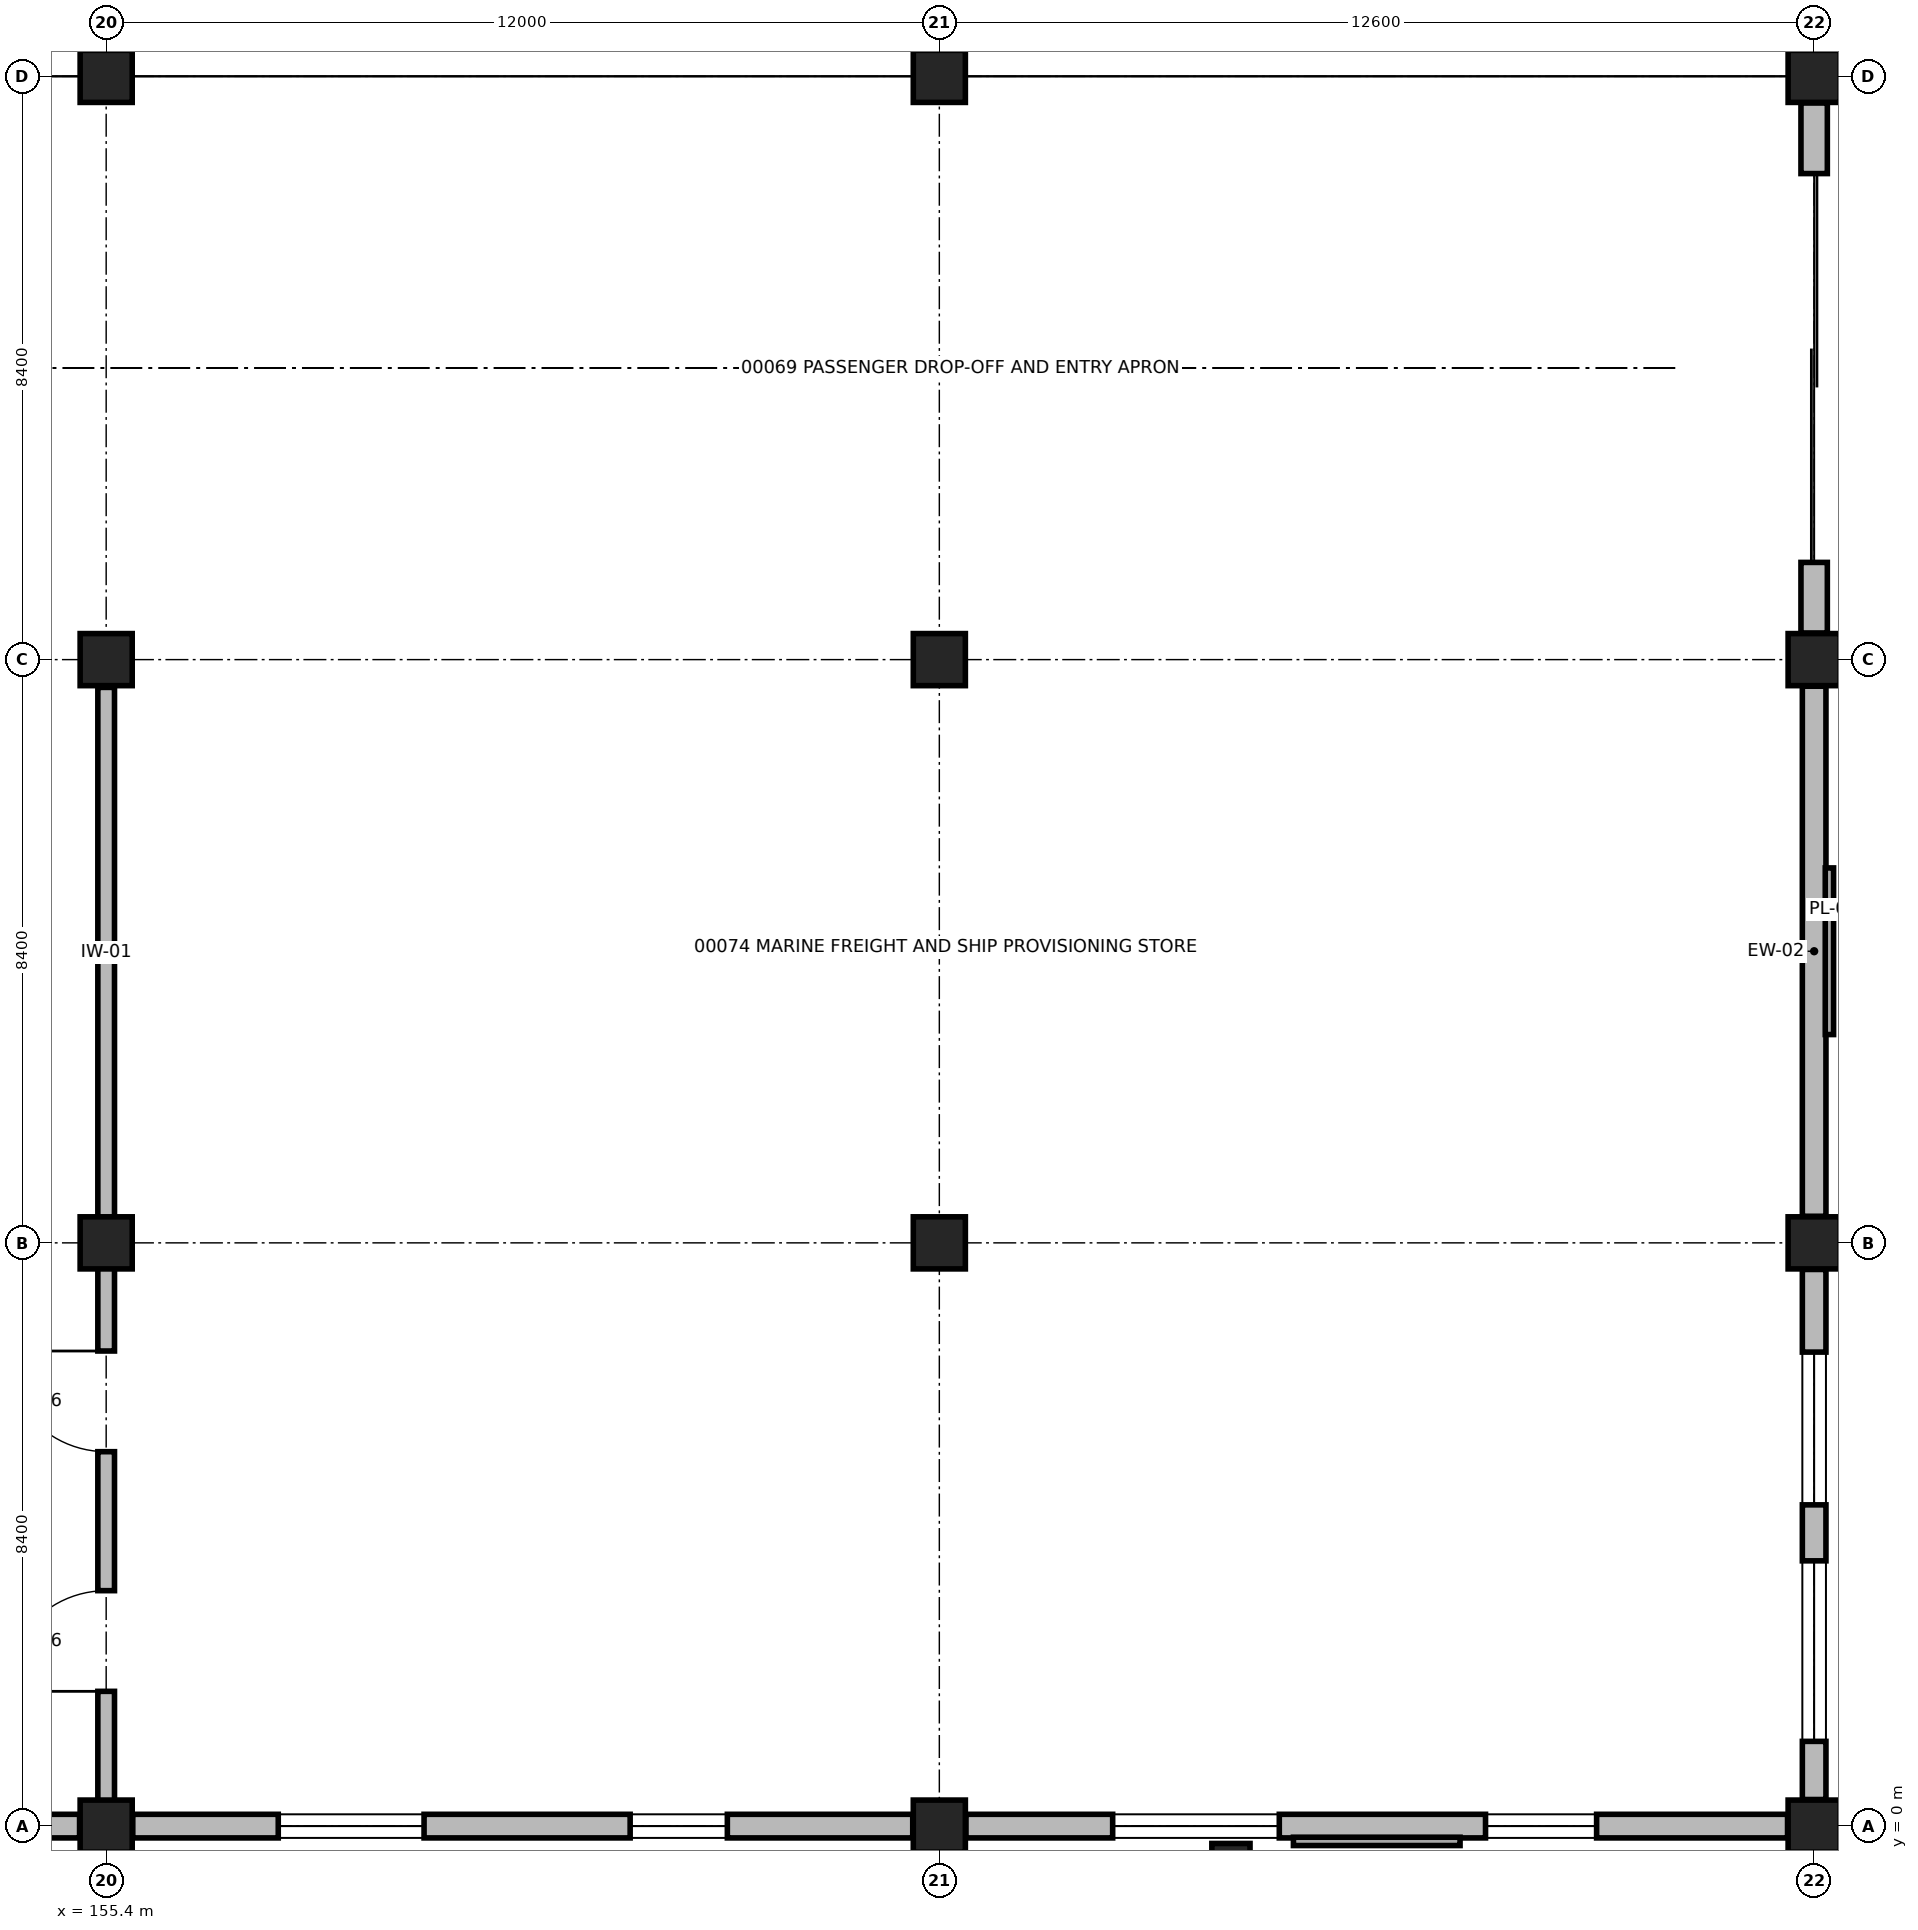
"""IFC4 building model, lengths in metres.
Left out: names, types, materials, properties, quantities, classifications, styles, units other than length and angle.
Written with IfcOpenShell. Run it as: python <this file> out.ifc"""

import sys

from ifc_helpers import new_model, si_unit, direction, frame, frame_2d, origin, origin_2d, place, context, subcontext, project, spatial, rectangle, extrude, element, fill, save


model = new_model("IFC4")
c1 = context("Model", 3, precision=1e-05, world=origin(), true_north=direction((0.0, 1.0)))
c2 = subcontext(c1, "Body", "Model", "MODEL_VIEW")
j1 = project(units=[si_unit("LENGTHUNIT", "METRE"), si_unit("PLANEANGLEUNIT", "RADIAN")], contexts=[c1])
p1 = place(None, origin())
s1 = spatial("IfcSite", under=j1, at=p1, CompositionType="ELEMENT")
p2 = place(p1, origin())
s2 = spatial("IfcBuilding", under=s1, at=p2, CompositionType="ELEMENT")
p3 = place(p2, origin())
s3 = spatial("IfcBuildingStorey", under=s2, at=p3, CompositionType="ELEMENT", Elevation=0.0)
for number, where, z_axis, x_axis in (
    (1, (155.4, 0.0, 0.0), (0.0, 0.0, 1.0), (1.0, 0.0, 0.0)),
    (2, (155.4, 8.4, 0.0), (0.0, 0.0, 1.0), (1.0, 0.0, 0.0)),
    (3, (155.4, 16.8, 0.0), (0.0, 0.0, 1.0), (1.0, 0.0, 0.0)),
    (4, (155.4, 25.2, 0.0), (0.0, 0.0, 1.0), (1.0, 0.0, 0.0)),
    (5, (167.4, 0.0, 0.0), (0.0, 0.0, 1.0), (1.0, 0.0, 0.0)),
    (6, (167.4, 8.4, 0.0), (0.0, 0.0, 1.0), (1.0, 0.0, 0.0)),
    (7, (167.4, 16.8, 0.0), (0.0, 0.0, 1.0), (1.0, 0.0, 0.0)),
    (8, (167.4, 25.2, 0.0), (0.0, 0.0, 1.0), (1.0, 0.0, 0.0)),
    (9, (180.0, 0.0, 0.0), (0.0, 0.0, 1.0), (1.0, 0.0, 0.0)),
    (10, (180.0, 8.4, 0.0), (0.0, 0.0, 1.0), (1.0, 0.0, 0.0)),
    (11, (180.0, 16.8, 0.0), (0.0, 0.0, 1.0), (1.0, 0.0, 0.0)),
    (12, (180.0, 25.2, 0.0), (0.0, 0.0, 1.0), (1.0, 0.0, 0.0)),
):
    element("IfcColumn", number, at=place(p3, frame(where, z_axis=z_axis, x_axis=x_axis)), inside=s3, PredefinedType="COLUMN", context=c2, shape_type="SweptSolid", body=[
        extrude(rectangle(XDim=0.75, YDim=0.75, at=origin_2d()), origin(), (0.0, 0.0, 1.0), 5.1),
    ])
p4 = place(p3, frame((171.6, -0.65, 0.0), z_axis=(0.0, 0.0, 1.0), x_axis=(1.0, 0.0, 0.0)))
e13 = element("IfcColumn", 13, at=p4, inside=s3, PredefinedType="PILASTER", context=c2, shape_type="SweptSolid", body=[
    extrude(rectangle(XDim=0.55, YDim=0.8, at=origin_2d()), origin(), (0.0, 0.0, 1.0), 5.1),
])
p5 = place(p3, frame((155.017, 0.0, 0.0), z_axis=(0.0, 0.0, 1.0), x_axis=(-1.0, 0.0, 0.0)))
e14 = element("IfcWall", 14, at=p5, inside=s3, PredefinedType="SOLIDWALL", context=c2, shape_type="SweptSolid", body=[
    extrude(rectangle(XDim=7.634, YDim=0.34, at=frame_2d((3.817, 0.0))), origin(), (0.0, 0.0, 1.0), 4.346),
])
p6 = place(p5, frame((1.69, 0.0, 1.3)))
e15 = element("IfcOpeningElement", 15, at=p6, cuts=e14, PredefinedType="OPENING", context=c2, shape_type="SweptSolid", body=[
    extrude(rectangle(XDim=1.2, YDim=1.75, at=frame_2d((0.6, 0.875))), frame((0.0, 0.18, 0.0), z_axis=(0.0, -1.0, 0.0), x_axis=(1.0, 0.0, 0.0)), (0.0, 0.0, 1.0), 0.36),
])
p7 = place(p5, frame((4.596, 0.0, 1.3)))
e16 = element("IfcOpeningElement", 16, at=p7, cuts=e14, PredefinedType="OPENING", context=c2, shape_type="SweptSolid", body=[
    extrude(rectangle(XDim=1.8, YDim=2.05, at=frame_2d((0.9, 1.025))), frame((0.0, 0.18, 0.0), z_axis=(0.0, -1.0, 0.0), x_axis=(1.0, 0.0, 0.0)), (0.0, 0.0, 1.0), 0.36),
])
p8 = place(p3, frame((167.017, 0.0, 0.0), z_axis=(0.0, 0.0, 1.0), x_axis=(-1.0, 0.0, 0.0)))
e17 = element("IfcWall", 17, at=p8, inside=s3, PredefinedType="SOLIDWALL", context=c2, shape_type="SweptSolid", body=[
    extrude(rectangle(XDim=11.234, YDim=0.34, at=frame_2d((5.617, 0.0))), origin(), (0.0, 0.0, 1.0), 4.346),
])
p9 = place(p8, frame((2.67, 0.0, 1.3)))
e18 = element("IfcOpeningElement", 18, at=p9, cuts=e17, PredefinedType="OPENING", context=c2, shape_type="SweptSolid", body=[
    extrude(rectangle(XDim=1.4, YDim=1.75, at=frame_2d((0.7, 0.875))), frame((0.0, 0.18, 0.0), z_axis=(0.0, -1.0, 0.0), x_axis=(1.0, 0.0, 0.0)), (0.0, 0.0, 1.0), 0.36),
])
p10 = place(p8, frame((7.039, 0.0, 1.3)))
e19 = element("IfcOpeningElement", 19, at=p10, cuts=e17, PredefinedType="OPENING", context=c2, shape_type="SweptSolid", body=[
    extrude(rectangle(XDim=2.1, YDim=2.05, at=frame_2d((1.05, 1.025))), frame((0.0, 0.18, 0.0), z_axis=(0.0, -1.0, 0.0), x_axis=(1.0, 0.0, 0.0)), (0.0, 0.0, 1.0), 0.36),
])
p11 = place(p3, frame((179.617, 0.0, 0.0), z_axis=(0.0, 0.0, 1.0), x_axis=(-1.0, 0.0, 0.0)))
e20 = element("IfcWall", 20, at=p11, inside=s3, PredefinedType="SOLIDWALL", context=c2, shape_type="SweptSolid", body=[
    extrude(rectangle(XDim=11.834, YDim=0.34, at=frame_2d((5.917, 0.0))), origin(), (0.0, 0.0, 1.0), 4.346),
])
p12 = place(p11, frame((2.75, 0.0, 1.3)))
e21 = element("IfcOpeningElement", 21, at=p12, cuts=e20, PredefinedType="OPENING", context=c2, shape_type="SweptSolid", body=[
    extrude(rectangle(XDim=1.6, YDim=1.75, at=frame_2d((0.8, 0.875))), frame((0.0, 0.18, 0.0), z_axis=(0.0, -1.0, 0.0), x_axis=(1.0, 0.0, 0.0)), (0.0, 0.0, 1.0), 0.36),
])
p13 = place(p11, frame((7.321, 0.0, 1.3)))
e22 = element("IfcOpeningElement", 22, at=p13, cuts=e20, PredefinedType="OPENING", context=c2, shape_type="SweptSolid", body=[
    extrude(rectangle(XDim=2.4, YDim=2.05, at=frame_2d((1.2, 1.025))), frame((0.0, 0.18, 0.0), z_axis=(0.0, -1.0, 0.0), x_axis=(1.0, 0.0, 0.0)), (0.0, 0.0, 1.0), 0.36),
])
p14 = place(p3, frame((180.0, 8.017, 0.0), z_axis=(0.0, 0.0, 1.0), x_axis=(0.0, -1.0, 0.0)))
e23 = element("IfcWall", 23, at=p14, inside=s3, PredefinedType="SOLIDWALL", context=c2, shape_type="SweptSolid", body=[
    extrude(rectangle(XDim=7.634, YDim=0.34, at=frame_2d((3.817, 0.0))), origin(), (0.0, 0.0, 1.0), 4.346),
])
p15 = place(p14, frame((1.19, 0.0, 1.2)))
e24 = element("IfcOpeningElement", 24, at=p15, cuts=e23, PredefinedType="OPENING", context=c2, shape_type="SweptSolid", body=[
    extrude(rectangle(XDim=2.2, YDim=1.45, at=frame_2d((1.1, 0.725))), frame((0.0, 0.18, 0.0), z_axis=(0.0, -1.0, 0.0), x_axis=(1.0, 0.0, 0.0)), (0.0, 0.0, 1.0), 0.36),
])
p16 = place(p14, frame((4.197, 0.0, 1.2)))
e25 = element("IfcOpeningElement", 25, at=p16, cuts=e23, PredefinedType="OPENING", context=c2, shape_type="SweptSolid", body=[
    extrude(rectangle(XDim=2.6, YDim=1.45, at=frame_2d((1.3, 0.725))), frame((0.0, 0.18, 0.0), z_axis=(0.0, -1.0, 0.0), x_axis=(1.0, 0.0, 0.0)), (0.0, 0.0, 1.0), 0.36),
])
p17 = place(p3, frame((180.0, 16.417, 0.0), z_axis=(0.0, 0.0, 1.0), x_axis=(0.0, -1.0, 0.0)))
e26 = element("IfcWall", 26, at=p17, inside=s3, PredefinedType="SOLIDWALL", context=c2, shape_type="SweptSolid", body=[
    extrude(rectangle(XDim=7.634, YDim=0.34, at=frame_2d((3.817, 0.0))), origin(), (0.0, 0.0, 1.0), 4.346),
])
p18 = place(p3, frame((180.0, 24.817, 0.0), z_axis=(0.0, 0.0, 1.0), x_axis=(0.0, -1.0, 0.0)))
e27 = element("IfcWall", 27, at=p18, inside=s3, PredefinedType="SOLIDWALL", context=c2, shape_type="SweptSolid", body=[
    extrude(rectangle(XDim=7.634, YDim=0.38, at=frame_2d((3.817, 0.0))), origin(), (0.0, 0.0, 1.0), 4.346),
])
p19 = place(p18, frame((1.017, 0.0, 0.0)))
e28 = element("IfcOpeningElement", 28, at=p19, cuts=e27, PredefinedType="OPENING", context=c2, shape_type="SweptSolid", body=[
    extrude(rectangle(XDim=5.6, YDim=3.9, at=frame_2d((2.8, 1.95))), frame((0.0, 0.2, 0.0), z_axis=(0.0, -1.0, 0.0), x_axis=(1.0, 0.0, 0.0)), (0.0, 0.0, 1.0), 0.4),
])
p20 = place(p3, frame((155.4, 0.365, 0.0), z_axis=(0.0, 0.0, 1.0), x_axis=(0.0, 1.0, 0.0)))
e29 = element("IfcWall", 29, at=p20, inside=s3, PredefinedType="SOLIDWALL", context=c2, shape_type="SweptSolid", body=[
    extrude(rectangle(XDim=7.67, YDim=0.24, at=frame_2d((3.835, 0.0))), origin(), (0.0, 0.0, 1.0), 4.346),
])
p21 = place(p20, frame((1.576, 0.0, 0.0)))
e30 = element("IfcOpeningElement", 30, at=p21, cuts=e29, PredefinedType="OPENING", context=c2, shape_type="SweptSolid", body=[
    extrude(rectangle(XDim=1.45, YDim=2.25, at=frame_2d((0.725, 1.125))), frame((0.0, 0.13, 0.0), z_axis=(0.0, -1.0, 0.0), x_axis=(1.0, 0.0, 0.0)), (0.0, 0.0, 1.0), 0.26),
])
p22 = place(p20, frame((5.028, 0.0, 0.0)))
e31 = element("IfcOpeningElement", 31, at=p22, cuts=e29, PredefinedType="OPENING", context=c2, shape_type="SweptSolid", body=[
    extrude(rectangle(XDim=1.45, YDim=2.25, at=frame_2d((0.725, 1.125))), frame((0.0, 0.13, 0.0), z_axis=(0.0, -1.0, 0.0), x_axis=(1.0, 0.0, 0.0)), (0.0, 0.0, 1.0), 0.26),
])
p23 = place(p3, frame((155.4, 8.765, 0.0), z_axis=(0.0, 0.0, 1.0), x_axis=(0.0, 1.0, 0.0)))
e32 = element("IfcWall", 32, at=p23, inside=s3, PredefinedType="SOLIDWALL", context=c2, shape_type="SweptSolid", body=[
    extrude(rectangle(XDim=7.635, YDim=0.24, at=frame_2d((3.817, 0.0))), origin(), (0.0, 0.0, 1.0), 4.346),
])
p24 = place(p9, origin())
e33 = element("IfcWindow", 33, at=p24, inside=s3, PartitioningType="SINGLE_PANEL", PredefinedType="WINDOW", context=c2, shape_type="SweptSolid", body=[
    extrude(rectangle(XDim=1.4, YDim=1.75, at=frame_2d((0.7, 0.875))), frame((0.0, 0.03, 0.0), z_axis=(0.0, -1.0, 0.0), x_axis=(1.0, 0.0, 0.0)), (0.0, 0.0, 1.0), 0.06),
])
fill(e18, e33)
p25 = place(p10, origin())
e34 = element("IfcWindow", 34, at=p25, inside=s3, PartitioningType="SINGLE_PANEL", PredefinedType="WINDOW", context=c2, shape_type="SweptSolid", body=[
    extrude(rectangle(XDim=2.1, YDim=2.05, at=frame_2d((1.05, 1.025))), frame((0.0, 0.03, 0.0), z_axis=(0.0, -1.0, 0.0), x_axis=(1.0, 0.0, 0.0)), (0.0, 0.0, 1.0), 0.06),
])
fill(e19, e34)
p26 = place(p12, origin())
e35 = element("IfcWindow", 35, at=p26, inside=s3, PartitioningType="SINGLE_PANEL", PredefinedType="WINDOW", context=c2, shape_type="SweptSolid", body=[
    extrude(rectangle(XDim=1.6, YDim=1.75, at=frame_2d((0.8, 0.875))), frame((0.0, 0.03, 0.0), z_axis=(0.0, -1.0, 0.0), x_axis=(1.0, 0.0, 0.0)), (0.0, 0.0, 1.0), 0.06),
])
fill(e21, e35)
p27 = place(p13, origin())
e36 = element("IfcWindow", 36, at=p27, inside=s3, PartitioningType="SINGLE_PANEL", PredefinedType="WINDOW", context=c2, shape_type="SweptSolid", body=[
    extrude(rectangle(XDim=2.4, YDim=2.05, at=frame_2d((1.2, 1.025))), frame((0.0, 0.03, 0.0), z_axis=(0.0, -1.0, 0.0), x_axis=(1.0, 0.0, 0.0)), (0.0, 0.0, 1.0), 0.06),
])
fill(e22, e36)
p28 = place(p15, origin())
e37 = element("IfcWindow", 37, at=p28, inside=s3, PartitioningType="SINGLE_PANEL", PredefinedType="WINDOW", context=c2, shape_type="SweptSolid", body=[
    extrude(rectangle(XDim=2.2, YDim=1.45, at=frame_2d((1.1, 0.725))), frame((0.0, 0.03, 0.0), z_axis=(0.0, -1.0, 0.0), x_axis=(1.0, 0.0, 0.0)), (0.0, 0.0, 1.0), 0.06),
])
fill(e24, e37)
p29 = place(p16, origin())
e38 = element("IfcWindow", 38, at=p29, inside=s3, PartitioningType="SINGLE_PANEL", PredefinedType="WINDOW", context=c2, shape_type="SweptSolid", body=[
    extrude(rectangle(XDim=2.6, YDim=1.45, at=frame_2d((1.3, 0.725))), frame((0.0, 0.03, 0.0), z_axis=(0.0, -1.0, 0.0), x_axis=(1.0, 0.0, 0.0)), (0.0, 0.0, 1.0), 0.06),
])
fill(e25, e38)
p30 = place(p19, origin())
e39 = element("IfcDoor", 39, at=p30, inside=s3, OperationType="ROLLINGUP", PredefinedType="GATE", context=c2, shape_type="SweptSolid", body=[
    extrude(rectangle(XDim=5.6, YDim=3.9, at=frame_2d((2.8, 1.95))), frame((0.0, 0.025, 0.0), z_axis=(0.0, -1.0, 0.0), x_axis=(1.0, 0.0, 0.0)), (0.0, 0.0, 1.0), 0.05),
])
fill(e28, e39)
p31 = place(p21, frame((1.45, 0.0, 0.0), z_axis=(0.0, 0.0, 1.0), x_axis=(-1.0, 0.0, 0.0)))
e40 = element("IfcDoor", 40, at=p31, inside=s3, OperationType="SINGLE_SWING_RIGHT", PredefinedType="DOOR", context=c2, shape_type="SweptSolid", body=[
    extrude(rectangle(XDim=1.45, YDim=2.25, at=frame_2d((0.725, 1.125))), frame((0.0, 0.025, 0.0), z_axis=(0.0, -1.0, 0.0), x_axis=(1.0, 0.0, 0.0)), (0.0, 0.0, 1.0), 0.05),
])
fill(e30, e40)
p32 = place(p22, frame((1.45, 0.0, 0.0), z_axis=(0.0, 0.0, 1.0), x_axis=(-1.0, 0.0, 0.0)))
e41 = element("IfcDoor", 41, at=p32, inside=s3, OperationType="SINGLE_SWING_LEFT", PredefinedType="DOOR", context=c2, shape_type="SweptSolid", body=[
    extrude(rectangle(XDim=1.45, YDim=2.25, at=frame_2d((0.725, 1.125))), frame((0.0, 0.025, 0.0), z_axis=(0.0, -1.0, 0.0), x_axis=(1.0, 0.0, 0.0)), (0.0, 0.0, 1.0), 0.05),
])
fill(e31, e41)
save(model, sys.argv[1])
